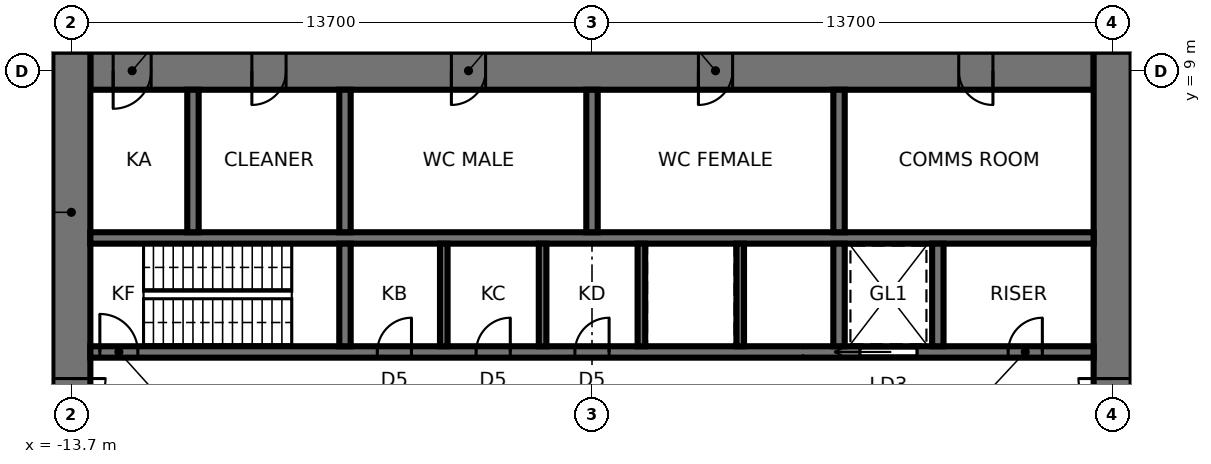
"""IFC4 building model, lengths in metres.
Left out: names, types, materials, properties, quantities, classifications, styles, units other than length and angle.
Written with IfcOpenShell. Run it as: python <this file> out.ifc"""

import sys

from ifc_helpers import new_model, si_unit, direction, frame, frame_2d, origin, place, context, subcontext, project, spatial, rectangle, extrude, element, fill, save


model = new_model("IFC4")
c1 = context("Model", 3, precision=1e-05, world=origin(), true_north=direction((0.0, 1.0)))
c2 = subcontext(c1, "Body", "Model", "MODEL_VIEW")
j1 = project(units=[si_unit("LENGTHUNIT", "METRE"), si_unit("PLANEANGLEUNIT", "RADIAN")], contexts=[c1])
p1 = place(None, origin())
s1 = spatial("IfcSite", under=j1, at=p1, CompositionType="ELEMENT")
p2 = place(p1, origin())
s2 = spatial("IfcBuilding", under=s1, at=p2, CompositionType="ELEMENT")
p3 = place(p2, frame((0.0, 0.0, 86.8)))
s3 = spatial("IfcBuildingStorey", under=s2, at=p3, CompositionType="ELEMENT", Elevation=86.8)
p4 = place(p3, frame((13.2, 9.0, 0.0), z_axis=(0.0, 0.0, 1.0), x_axis=(-1.0, 0.0, 0.0)))
e1 = element("IfcWall", 1, at=p4, inside=s3, PredefinedType="SHEAR", context=c2, shape_type="SweptSolid", body=[
    extrude(rectangle(XDim=26.4, YDim=1.0, at=frame_2d((13.2, 0.0))), origin(), (0.0, 0.0, 1.0), 5.6),
])
p5 = place(p4, frame((2.65, 0.0, 0.0)))
e2 = element("IfcOpeningElement", 2, at=p5, cuts=e1, PredefinedType="OPENING", context=c2, shape_type="SweptSolid", body=[
    extrude(rectangle(XDim=0.9, YDim=2.1, at=frame_2d((0.45, 1.05))), frame((0.0, 0.51, 0.0), z_axis=(0.0, -1.0, 0.0), x_axis=(1.0, 0.0, 0.0)), (0.0, 0.0, 1.0), 1.02),
])
p6 = place(p4, frame((9.5, 0.0, 0.0)))
e3 = element("IfcOpeningElement", 3, at=p6, cuts=e1, PredefinedType="OPENING", context=c2, shape_type="SweptSolid", body=[
    extrude(rectangle(XDim=0.9, YDim=2.1, at=frame_2d((0.45, 1.05))), frame((0.0, 0.51, 0.0), z_axis=(0.0, -1.0, 0.0), x_axis=(1.0, 0.0, 0.0)), (0.0, 0.0, 1.0), 1.02),
])
p7 = place(p4, frame((16.0, 0.0, 0.0)))
e4 = element("IfcOpeningElement", 4, at=p7, cuts=e1, PredefinedType="OPENING", context=c2, shape_type="SweptSolid", body=[
    extrude(rectangle(XDim=0.9, YDim=2.1, at=frame_2d((0.45, 1.05))), frame((0.0, 0.51, 0.0), z_axis=(0.0, -1.0, 0.0), x_axis=(1.0, 0.0, 0.0)), (0.0, 0.0, 1.0), 1.02),
])
p8 = place(p4, frame((21.25, 0.0, 0.0)))
e5 = element("IfcOpeningElement", 5, at=p8, cuts=e1, PredefinedType="OPENING", context=c2, shape_type="SweptSolid", body=[
    extrude(rectangle(XDim=0.9, YDim=2.1, at=frame_2d((0.45, 1.05))), frame((0.0, 0.51, 0.0), z_axis=(0.0, -1.0, 0.0), x_axis=(1.0, 0.0, 0.0)), (0.0, 0.0, 1.0), 1.02),
])
p9 = place(p4, frame((24.8, 0.0, 0.0)))
e6 = element("IfcOpeningElement", 6, at=p9, cuts=e1, PredefinedType="OPENING", context=c2, shape_type="SweptSolid", body=[
    extrude(rectangle(XDim=1.0, YDim=2.1, at=frame_2d((0.5, 1.05))), frame((0.0, 0.51, 0.0), z_axis=(0.0, -1.0, 0.0), x_axis=(1.0, 0.0, 0.0)), (0.0, 0.0, 1.0), 1.02),
])
p10 = place(p3, frame((13.7, -9.5, 0.0), z_axis=(0.0, 0.0, 1.0), x_axis=(0.0, 1.0, 0.0)))
e7 = element("IfcWall", 7, at=p10, inside=s3, PredefinedType="SHEAR", context=c2, shape_type="SweptSolid", body=[
    extrude(rectangle(XDim=19.0, YDim=1.0, at=frame_2d((9.5, 0.0))), origin(), (0.0, 0.0, 1.0), 5.6),
])
p11 = place(p10, frame((8.6, 0.0, 0.0)))
e8 = element("IfcOpeningElement", 8, at=p11, cuts=e7, PredefinedType="OPENING", context=c2, shape_type="SweptSolid", body=[
    extrude(rectangle(XDim=1.8, YDim=2.4, at=frame_2d((0.9, 1.2))), frame((0.0, 0.51, 0.0), z_axis=(0.0, -1.0, 0.0), x_axis=(1.0, 0.0, 0.0)), (0.0, 0.0, 1.0), 1.02),
])
p12 = place(p3, frame((-13.7, 9.5, 0.0), z_axis=(0.0, 0.0, 1.0), x_axis=(0.0, -1.0, 0.0)))
e9 = element("IfcWall", 9, at=p12, inside=s3, PredefinedType="SHEAR", context=c2, shape_type="SweptSolid", body=[
    extrude(rectangle(XDim=19.0, YDim=1.0, at=frame_2d((9.5, 0.0))), origin(), (0.0, 0.0, 1.0), 5.6),
])
p13 = place(p12, frame((8.6, 0.0, 0.0)))
e10 = element("IfcOpeningElement", 10, at=p13, cuts=e9, PredefinedType="OPENING", context=c2, shape_type="SweptSolid", body=[
    extrude(rectangle(XDim=1.8, YDim=2.4, at=frame_2d((0.9, 1.2))), frame((0.0, 0.51, 0.0), z_axis=(0.0, -1.0, 0.0), x_axis=(1.0, 0.0, 0.0)), (0.0, 0.0, 1.0), 1.02),
])
p14 = place(p3, frame((-13.2, 1.6, 0.0), z_axis=(0.0, 0.0, 1.0), x_axis=(1.0, 0.0, 0.0)))
e11 = element("IfcWall", 11, at=p14, inside=s3, PredefinedType="SHEAR", context=c2, shape_type="SweptSolid", body=[
    extrude(rectangle(XDim=26.4, YDim=0.3, at=frame_2d((13.2, 0.0))), origin(), (0.0, 0.0, 1.0), 5.6),
])
p15 = place(p14, frame((0.25, 0.0, 0.0)))
e12 = element("IfcOpeningElement", 12, at=p15, cuts=e11, PredefinedType="OPENING", context=c2, shape_type="SweptSolid", body=[
    extrude(rectangle(XDim=1.0, YDim=2.1, at=frame_2d((0.5, 1.05))), frame((0.0, 0.16, 0.0), z_axis=(0.0, -1.0, 0.0), x_axis=(1.0, 0.0, 0.0)), (0.0, 0.0, 1.0), 0.32),
])
p16 = place(p14, frame((20.25, 0.0, 0.0)))
e13 = element("IfcOpeningElement", 13, at=p16, cuts=e11, PredefinedType="OPENING", context=c2, shape_type="SweptSolid", body=[
    extrude(rectangle(XDim=1.5, YDim=2.4, at=frame_2d((0.75, 1.2))), frame((0.0, 0.16, 0.0), z_axis=(0.0, -1.0, 0.0), x_axis=(1.0, 0.0, 0.0)), (0.0, 0.0, 1.0), 0.32),
])
p17 = place(p14, frame((7.55, 0.0, 0.0)))
e14 = element("IfcOpeningElement", 14, at=p17, cuts=e11, PredefinedType="OPENING", context=c2, shape_type="SweptSolid", body=[
    extrude(rectangle(XDim=0.9, YDim=2.1, at=frame_2d((0.45, 1.05))), frame((0.0, 0.16, 0.0), z_axis=(0.0, -1.0, 0.0), x_axis=(1.0, 0.0, 0.0)), (0.0, 0.0, 1.0), 0.32),
])
p18 = place(p14, frame((10.15, 0.0, 0.0)))
e15 = element("IfcOpeningElement", 15, at=p18, cuts=e11, PredefinedType="OPENING", context=c2, shape_type="SweptSolid", body=[
    extrude(rectangle(XDim=0.9, YDim=2.1, at=frame_2d((0.45, 1.05))), frame((0.0, 0.16, 0.0), z_axis=(0.0, -1.0, 0.0), x_axis=(1.0, 0.0, 0.0)), (0.0, 0.0, 1.0), 0.32),
])
p19 = place(p14, frame((12.75, 0.0, 0.0)))
e16 = element("IfcOpeningElement", 16, at=p19, cuts=e11, PredefinedType="OPENING", context=c2, shape_type="SweptSolid", body=[
    extrude(rectangle(XDim=0.9, YDim=2.1, at=frame_2d((0.45, 1.05))), frame((0.0, 0.16, 0.0), z_axis=(0.0, -1.0, 0.0), x_axis=(1.0, 0.0, 0.0)), (0.0, 0.0, 1.0), 0.32),
])
p20 = place(p14, frame((24.15, 0.0, 0.0)))
e17 = element("IfcOpeningElement", 17, at=p20, cuts=e11, PredefinedType="OPENING", context=c2, shape_type="SweptSolid", body=[
    extrude(rectangle(XDim=0.9, YDim=2.1, at=frame_2d((0.45, 1.05))), frame((0.0, 0.16, 0.0), z_axis=(0.0, -1.0, 0.0), x_axis=(1.0, 0.0, 0.0)), (0.0, 0.0, 1.0), 0.32),
])
p21 = place(p3, frame((-13.2, 4.6, 0.0), z_axis=(0.0, 0.0, 1.0), x_axis=(1.0, 0.0, 0.0)))
e18 = element("IfcWall", 18, at=p21, inside=s3, PredefinedType="SHEAR", context=c2, shape_type="SweptSolid", body=[
    extrude(rectangle(XDim=26.4, YDim=0.3, at=frame_2d((13.2, 0.0))), origin(), (0.0, 0.0, 1.0), 5.6),
])
p22 = place(p3, frame((-6.5, 1.75, 0.0), z_axis=(0.0, 0.0, 1.0), x_axis=(0.0, 1.0, 0.0)))
e19 = element("IfcWall", 19, at=p22, inside=s3, PredefinedType="SHEAR", context=c2, shape_type="SweptSolid", body=[
    extrude(rectangle(XDim=2.7, YDim=0.3, at=frame_2d((1.35, 0.0))), origin(), (0.0, 0.0, 1.0), 5.6),
])
p23 = place(p3, frame((-6.5, 4.75, 0.0), z_axis=(0.0, 0.0, 1.0), x_axis=(0.0, 1.0, 0.0)))
e20 = element("IfcWall", 20, at=p23, inside=s3, PredefinedType="SHEAR", context=c2, shape_type="SweptSolid", body=[
    extrude(rectangle(XDim=3.75, YDim=0.3, at=frame_2d((1.875, 0.0))), origin(), (0.0, 0.0, 1.0), 5.6),
])
p24 = place(p3, frame((6.5, 1.75, 0.0), z_axis=(0.0, 0.0, 1.0), x_axis=(0.0, 1.0, 0.0)))
e21 = element("IfcWall", 21, at=p24, inside=s3, PredefinedType="SHEAR", context=c2, shape_type="SweptSolid", body=[
    extrude(rectangle(XDim=2.7, YDim=0.3, at=frame_2d((1.35, 0.0))), origin(), (0.0, 0.0, 1.0), 5.6),
])
p25 = place(p3, frame((6.5, 4.75, 0.0), z_axis=(0.0, 0.0, 1.0), x_axis=(0.0, 1.0, 0.0)))
e22 = element("IfcWall", 22, at=p25, inside=s3, PredefinedType="SHEAR", context=c2, shape_type="SweptSolid", body=[
    extrude(rectangle(XDim=3.75, YDim=0.3, at=frame_2d((1.875, 0.0))), origin(), (0.0, 0.0, 1.0), 5.6),
])
for number, where, z_axis, x_axis in (
    (23, (-3.9, 1.75, 0.0), (0.0, 0.0, 1.0), (0.0, 1.0, 0.0)),
    (24, (-1.3, 1.75, 0.0), (0.0, 0.0, 1.0), (0.0, 1.0, 0.0)),
    (25, (1.3, 1.75, 0.0), (0.0, 0.0, 1.0), (0.0, 1.0, 0.0)),
    (26, (3.9, 1.75, 0.0), (0.0, 0.0, 1.0), (0.0, 1.0, 0.0)),
):
    element("IfcWall", number, at=place(p3, frame(where, z_axis=z_axis, x_axis=x_axis)), inside=s3, PredefinedType="SHEAR", context=c2, shape_type="SweptSolid", body=[
        extrude(rectangle(XDim=2.7, YDim=0.2, at=frame_2d((1.35, 0.0))), origin(), (0.0, 0.0, 1.0), 5.6),
    ])
for number, where, z_axis, x_axis in (
    (27, (0.0, 4.75, 0.0), (0.0, 0.0, 1.0), (0.0, 1.0, 0.0)),
    (28, (-10.5, 4.75, 0.0), (0.0, 0.0, 1.0), (0.0, 1.0, 0.0)),
):
    element("IfcWall", number, at=place(p3, frame(where, z_axis=z_axis, x_axis=x_axis)), inside=s3, PredefinedType="SHEAR", context=c2, shape_type="SweptSolid", body=[
        extrude(rectangle(XDim=3.75, YDim=0.3, at=frame_2d((1.875, 0.0))), origin(), (0.0, 0.0, 1.0), 5.6),
    ])
p26 = place(p3, frame((9.1, 1.75, 0.0), z_axis=(0.0, 0.0, 1.0), x_axis=(0.0, 1.0, 0.0)))
e29 = element("IfcWall", 29, at=p26, inside=s3, PredefinedType="SHEAR", context=c2, shape_type="SweptSolid", body=[
    extrude(rectangle(XDim=2.7, YDim=0.3, at=frame_2d((1.35, 0.0))), origin(), (0.0, 0.0, 1.0), 5.6),
])
p27 = place(p13, origin())
e30 = element("IfcDoor", 30, at=p27, inside=s3, OperationType="DOUBLE_DOOR_SINGLE_SWING", PredefinedType="DOOR", context=c2, shape_type="SweptSolid", body=[
    extrude(rectangle(XDim=1.72, YDim=2.36, at=frame_2d((0.9, 1.18))), frame((0.0, 0.025, 0.0), z_axis=(0.0, -1.0, 0.0), x_axis=(1.0, 0.0, 0.0)), (0.0, 0.0, 1.0), 0.05),
    extrude(rectangle(XDim=0.04, YDim=2.4, at=frame_2d((0.02, 1.2))), frame((0.0, 0.25, 0.0), z_axis=(0.0, -1.0, 0.0), x_axis=(1.0, 0.0, 0.0)), (0.0, 0.0, 1.0), 0.5),
    extrude(rectangle(XDim=0.04, YDim=2.4, at=frame_2d((1.78, 1.2))), frame((0.0, 0.25, 0.0), z_axis=(0.0, -1.0, 0.0), x_axis=(1.0, 0.0, 0.0)), (0.0, 0.0, 1.0), 0.5),
    extrude(rectangle(XDim=1.72, YDim=0.04, at=frame_2d((0.9, 2.38))), frame((0.0, 0.25, 0.0), z_axis=(0.0, -1.0, 0.0), x_axis=(1.0, 0.0, 0.0)), (0.0, 0.0, 1.0), 0.5),
])
fill(e10, e30)
p28 = place(p11, origin())
e31 = element("IfcDoor", 31, at=p28, inside=s3, OperationType="DOUBLE_DOOR_SINGLE_SWING", PredefinedType="DOOR", context=c2, shape_type="SweptSolid", body=[
    extrude(rectangle(XDim=1.72, YDim=2.36, at=frame_2d((0.9, 1.18))), frame((0.0, 0.025, 0.0), z_axis=(0.0, -1.0, 0.0), x_axis=(1.0, 0.0, 0.0)), (0.0, 0.0, 1.0), 0.05),
    extrude(rectangle(XDim=0.04, YDim=2.4, at=frame_2d((0.02, 1.2))), frame((0.0, 0.25, 0.0), z_axis=(0.0, -1.0, 0.0), x_axis=(1.0, 0.0, 0.0)), (0.0, 0.0, 1.0), 0.5),
    extrude(rectangle(XDim=0.04, YDim=2.4, at=frame_2d((1.78, 1.2))), frame((0.0, 0.25, 0.0), z_axis=(0.0, -1.0, 0.0), x_axis=(1.0, 0.0, 0.0)), (0.0, 0.0, 1.0), 0.5),
    extrude(rectangle(XDim=1.72, YDim=0.04, at=frame_2d((0.9, 2.38))), frame((0.0, 0.25, 0.0), z_axis=(0.0, -1.0, 0.0), x_axis=(1.0, 0.0, 0.0)), (0.0, 0.0, 1.0), 0.5),
])
fill(e8, e31)
p29 = place(p15, origin())
e32 = element("IfcDoor", 32, at=p29, inside=s3, OperationType="SINGLE_SWING_LEFT", PredefinedType="DOOR", context=c2, shape_type="SweptSolid", body=[
    extrude(rectangle(XDim=1.0, YDim=2.1, at=frame_2d((0.5, 1.05))), frame((0.0, 0.025, 0.0), z_axis=(0.0, -1.0, 0.0), x_axis=(1.0, 0.0, 0.0)), (0.0, 0.0, 1.0), 0.05),
])
fill(e12, e32)
p30 = place(p16, origin())
e33 = element("IfcDoor", 33, at=p30, inside=s3, OperationType="SLIDING_TO_LEFT", PredefinedType="DOOR", context=c2, shape_type="SweptSolid", body=[
    extrude(rectangle(XDim=1.5, YDim=2.4, at=frame_2d((0.75, 1.2))), frame((0.0, 0.025, 0.0), z_axis=(0.0, -1.0, 0.0), x_axis=(1.0, 0.0, 0.0)), (0.0, 0.0, 1.0), 0.05),
])
fill(e13, e33)
p31 = place(p17, origin())
e34 = element("IfcDoor", 34, at=p31, inside=s3, OperationType="SINGLE_SWING_RIGHT", PredefinedType="DOOR", context=c2, shape_type="SweptSolid", body=[
    extrude(rectangle(XDim=0.9, YDim=2.1, at=frame_2d((0.45, 1.05))), frame((0.0, 0.025, 0.0), z_axis=(0.0, -1.0, 0.0), x_axis=(1.0, 0.0, 0.0)), (0.0, 0.0, 1.0), 0.05),
])
fill(e14, e34)
p32 = place(p18, origin())
e35 = element("IfcDoor", 35, at=p32, inside=s3, OperationType="SINGLE_SWING_RIGHT", PredefinedType="DOOR", context=c2, shape_type="SweptSolid", body=[
    extrude(rectangle(XDim=0.9, YDim=2.1, at=frame_2d((0.45, 1.05))), frame((0.0, 0.025, 0.0), z_axis=(0.0, -1.0, 0.0), x_axis=(1.0, 0.0, 0.0)), (0.0, 0.0, 1.0), 0.05),
])
fill(e15, e35)
p33 = place(p19, origin())
e36 = element("IfcDoor", 36, at=p33, inside=s3, OperationType="SINGLE_SWING_RIGHT", PredefinedType="DOOR", context=c2, shape_type="SweptSolid", body=[
    extrude(rectangle(XDim=0.9, YDim=2.1, at=frame_2d((0.45, 1.05))), frame((0.0, 0.025, 0.0), z_axis=(0.0, -1.0, 0.0), x_axis=(1.0, 0.0, 0.0)), (0.0, 0.0, 1.0), 0.05),
])
fill(e16, e36)
p34 = place(p20, origin())
e37 = element("IfcDoor", 37, at=p34, inside=s3, OperationType="SINGLE_SWING_RIGHT", PredefinedType="DOOR", context=c2, shape_type="SweptSolid", body=[
    extrude(rectangle(XDim=0.9, YDim=2.1, at=frame_2d((0.45, 1.05))), frame((0.0, 0.025, 0.0), z_axis=(0.0, -1.0, 0.0), x_axis=(1.0, 0.0, 0.0)), (0.0, 0.0, 1.0), 0.05),
])
fill(e17, e37)
p35 = place(p5, origin())
e38 = element("IfcDoor", 38, at=p35, inside=s3, OperationType="SINGLE_SWING_LEFT", PredefinedType="DOOR", context=c2, shape_type="SweptSolid", body=[
    extrude(rectangle(XDim=0.82, YDim=2.06, at=frame_2d((0.45, 1.03))), frame((0.0, 0.025, 0.0), z_axis=(0.0, -1.0, 0.0), x_axis=(1.0, 0.0, 0.0)), (0.0, 0.0, 1.0), 0.05),
    extrude(rectangle(XDim=0.04, YDim=2.1, at=frame_2d((0.02, 1.05))), frame((0.0, 0.25, 0.0), z_axis=(0.0, -1.0, 0.0), x_axis=(1.0, 0.0, 0.0)), (0.0, 0.0, 1.0), 0.5),
    extrude(rectangle(XDim=0.04, YDim=2.1, at=frame_2d((0.88, 1.05))), frame((0.0, 0.25, 0.0), z_axis=(0.0, -1.0, 0.0), x_axis=(1.0, 0.0, 0.0)), (0.0, 0.0, 1.0), 0.5),
    extrude(rectangle(XDim=0.82, YDim=0.04, at=frame_2d((0.45, 2.08))), frame((0.0, 0.25, 0.0), z_axis=(0.0, -1.0, 0.0), x_axis=(1.0, 0.0, 0.0)), (0.0, 0.0, 1.0), 0.5),
])
fill(e2, e38)
p36 = place(p6, origin())
e39 = element("IfcDoor", 39, at=p36, inside=s3, OperationType="SINGLE_SWING_RIGHT", PredefinedType="DOOR", context=c2, shape_type="SweptSolid", body=[
    extrude(rectangle(XDim=0.82, YDim=2.06, at=frame_2d((0.45, 1.03))), frame((0.0, 0.025, 0.0), z_axis=(0.0, -1.0, 0.0), x_axis=(1.0, 0.0, 0.0)), (0.0, 0.0, 1.0), 0.05),
    extrude(rectangle(XDim=0.04, YDim=2.1, at=frame_2d((0.02, 1.05))), frame((0.0, 0.25, 0.0), z_axis=(0.0, -1.0, 0.0), x_axis=(1.0, 0.0, 0.0)), (0.0, 0.0, 1.0), 0.5),
    extrude(rectangle(XDim=0.04, YDim=2.1, at=frame_2d((0.88, 1.05))), frame((0.0, 0.25, 0.0), z_axis=(0.0, -1.0, 0.0), x_axis=(1.0, 0.0, 0.0)), (0.0, 0.0, 1.0), 0.5),
    extrude(rectangle(XDim=0.82, YDim=0.04, at=frame_2d((0.45, 2.08))), frame((0.0, 0.25, 0.0), z_axis=(0.0, -1.0, 0.0), x_axis=(1.0, 0.0, 0.0)), (0.0, 0.0, 1.0), 0.5),
])
fill(e3, e39)
p37 = place(p7, origin())
e40 = element("IfcDoor", 40, at=p37, inside=s3, OperationType="SINGLE_SWING_RIGHT", PredefinedType="DOOR", context=c2, shape_type="SweptSolid", body=[
    extrude(rectangle(XDim=0.82, YDim=2.06, at=frame_2d((0.45, 1.03))), frame((0.0, 0.025, 0.0), z_axis=(0.0, -1.0, 0.0), x_axis=(1.0, 0.0, 0.0)), (0.0, 0.0, 1.0), 0.05),
    extrude(rectangle(XDim=0.04, YDim=2.1, at=frame_2d((0.02, 1.05))), frame((0.0, 0.25, 0.0), z_axis=(0.0, -1.0, 0.0), x_axis=(1.0, 0.0, 0.0)), (0.0, 0.0, 1.0), 0.5),
    extrude(rectangle(XDim=0.04, YDim=2.1, at=frame_2d((0.88, 1.05))), frame((0.0, 0.25, 0.0), z_axis=(0.0, -1.0, 0.0), x_axis=(1.0, 0.0, 0.0)), (0.0, 0.0, 1.0), 0.5),
    extrude(rectangle(XDim=0.82, YDim=0.04, at=frame_2d((0.45, 2.08))), frame((0.0, 0.25, 0.0), z_axis=(0.0, -1.0, 0.0), x_axis=(1.0, 0.0, 0.0)), (0.0, 0.0, 1.0), 0.5),
])
fill(e4, e40)
p38 = place(p8, origin())
e41 = element("IfcDoor", 41, at=p38, inside=s3, OperationType="SINGLE_SWING_RIGHT", PredefinedType="DOOR", context=c2, shape_type="SweptSolid", body=[
    extrude(rectangle(XDim=0.82, YDim=2.06, at=frame_2d((0.45, 1.03))), frame((0.0, 0.025, 0.0), z_axis=(0.0, -1.0, 0.0), x_axis=(1.0, 0.0, 0.0)), (0.0, 0.0, 1.0), 0.05),
    extrude(rectangle(XDim=0.04, YDim=2.1, at=frame_2d((0.02, 1.05))), frame((0.0, 0.25, 0.0), z_axis=(0.0, -1.0, 0.0), x_axis=(1.0, 0.0, 0.0)), (0.0, 0.0, 1.0), 0.5),
    extrude(rectangle(XDim=0.04, YDim=2.1, at=frame_2d((0.88, 1.05))), frame((0.0, 0.25, 0.0), z_axis=(0.0, -1.0, 0.0), x_axis=(1.0, 0.0, 0.0)), (0.0, 0.0, 1.0), 0.5),
    extrude(rectangle(XDim=0.82, YDim=0.04, at=frame_2d((0.45, 2.08))), frame((0.0, 0.25, 0.0), z_axis=(0.0, -1.0, 0.0), x_axis=(1.0, 0.0, 0.0)), (0.0, 0.0, 1.0), 0.5),
])
fill(e5, e41)
p39 = place(p9, origin())
e42 = element("IfcDoor", 42, at=p39, inside=s3, OperationType="SINGLE_SWING_RIGHT", PredefinedType="DOOR", context=c2, shape_type="SweptSolid", body=[
    extrude(rectangle(XDim=0.92, YDim=2.06, at=frame_2d((0.5, 1.03))), frame((0.0, 0.025, 0.0), z_axis=(0.0, -1.0, 0.0), x_axis=(1.0, 0.0, 0.0)), (0.0, 0.0, 1.0), 0.05),
    extrude(rectangle(XDim=0.04, YDim=2.1, at=frame_2d((0.02, 1.05))), frame((0.0, 0.25, 0.0), z_axis=(0.0, -1.0, 0.0), x_axis=(1.0, 0.0, 0.0)), (0.0, 0.0, 1.0), 0.5),
    extrude(rectangle(XDim=0.04, YDim=2.1, at=frame_2d((0.98, 1.05))), frame((0.0, 0.25, 0.0), z_axis=(0.0, -1.0, 0.0), x_axis=(1.0, 0.0, 0.0)), (0.0, 0.0, 1.0), 0.5),
    extrude(rectangle(XDim=0.92, YDim=0.04, at=frame_2d((0.5, 2.08))), frame((0.0, 0.25, 0.0), z_axis=(0.0, -1.0, 0.0), x_axis=(1.0, 0.0, 0.0)), (0.0, 0.0, 1.0), 0.5),
])
fill(e6, e42)
save(model, sys.argv[1])
